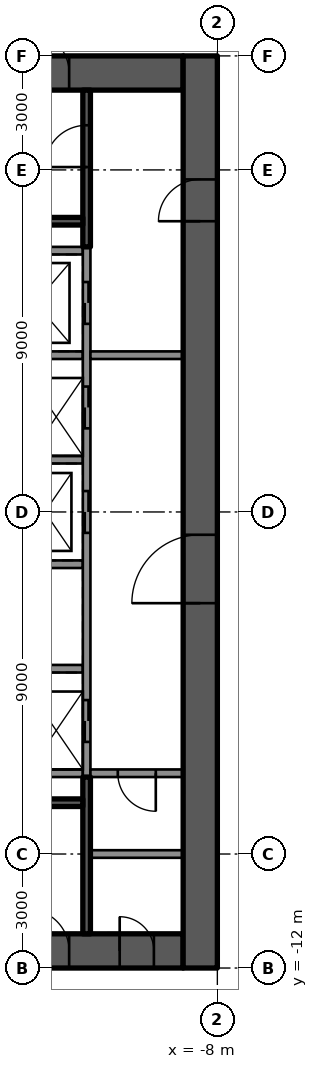
"""IFC4 building model, lengths in metres.
Left out: names, types, materials, properties, quantities, classifications, styles, units other than length and angle.
Written with IfcOpenShell. Run it as: python <this file> out.ifc"""

import sys

from ifc_helpers import new_model, si_unit, direction, frame, frame_2d, origin, place, context, subcontext, project, spatial, rectangle, extrude, element, fill, save


model = new_model("IFC4")
c1 = context("Model", 3, precision=1e-05, world=origin(), true_north=direction((0.0, 1.0)))
c2 = subcontext(c1, "Body", "Model", "MODEL_VIEW")
j1 = project(units=[si_unit("LENGTHUNIT", "METRE"), si_unit("PLANEANGLEUNIT", "RADIAN")], contexts=[c1])
p1 = place(None, origin())
s1 = spatial("IfcSite", under=j1, at=p1, CompositionType="ELEMENT")
p2 = place(p1, origin())
s2 = spatial("IfcBuilding", under=s1, at=p2, CompositionType="ELEMENT")
p3 = place(p2, frame((0.0, 0.0, 25.1)))
s3 = spatial("IfcBuildingStorey", under=s2, at=p3, CompositionType="ELEMENT", Elevation=25.1)
p4 = place(p3, frame((-18.1, 11.55, 0.0), z_axis=(0.0, 0.0, 1.0), x_axis=(1.0, 0.0, 0.0)))
e1 = element("IfcWall", 1, at=p4, inside=s3, PredefinedType="SHEAR", context=c2, shape_type="SweptSolid", body=[
    extrude(rectangle(XDim=9.2, YDim=0.9, at=frame_2d((4.6, 0.0))), origin(), (0.0, 0.0, 1.0), 4.1),
])
p5 = place(p4, frame((5.1, 0.0, 0.0)))
e2 = element("IfcOpeningElement", 2, at=p5, cuts=e1, PredefinedType="OPENING", context=c2, shape_type="SweptSolid", body=[
    extrude(rectangle(XDim=1.1, YDim=2.1, at=frame_2d((0.55, 1.05))), frame((0.0, 0.46, 0.0), z_axis=(0.0, -1.0, 0.0), x_axis=(1.0, 0.0, 0.0)), (0.0, 0.0, 1.0), 0.92),
])
p6 = place(p3, frame((-18.1, -11.55, 0.0), z_axis=(0.0, 0.0, 1.0), x_axis=(1.0, 0.0, 0.0)))
e3 = element("IfcWall", 3, at=p6, inside=s3, PredefinedType="SHEAR", context=c2, shape_type="SweptSolid", body=[
    extrude(rectangle(XDim=9.2, YDim=0.9, at=frame_2d((4.6, 0.0))), origin(), (0.0, 0.0, 1.0), 4.1),
])
p7 = place(p6, frame((5.1, 0.0, 0.0)))
e4 = element("IfcOpeningElement", 4, at=p7, cuts=e3, PredefinedType="OPENING", context=c2, shape_type="SweptSolid", body=[
    extrude(rectangle(XDim=1.1, YDim=2.1, at=frame_2d((0.55, 1.05))), frame((0.0, 0.46, 0.0), z_axis=(0.0, -1.0, 0.0), x_axis=(1.0, 0.0, 0.0)), (0.0, 0.0, 1.0), 0.92),
])
p8 = place(p6, frame((7.53, 0.0, 0.0)))
e5 = element("IfcOpeningElement", 5, at=p8, cuts=e3, PredefinedType="OPENING", context=c2, shape_type="SweptSolid", body=[
    extrude(rectangle(XDim=0.9, YDim=2.1, at=frame_2d((0.45, 1.05))), frame((0.0, 0.46, 0.0), z_axis=(0.0, -1.0, 0.0), x_axis=(1.0, 0.0, 0.0)), (0.0, 0.0, 1.0), 0.92),
])
p9 = place(p3, frame((-8.45, -12.0, 0.0), z_axis=(0.0, 0.0, 1.0), x_axis=(0.0, 1.0, 0.0)))
e6 = element("IfcWall", 6, at=p9, inside=s3, PredefinedType="SHEAR", context=c2, shape_type="SweptSolid", body=[
    extrude(rectangle(XDim=24.0, YDim=0.9, at=frame_2d((12.0, 0.0))), origin(), (0.0, 0.0, 1.0), 4.1),
])
p10 = place(p9, frame((9.6, 0.0, 0.0)))
e7 = element("IfcOpeningElement", 7, at=p10, cuts=e6, PredefinedType="OPENING", context=c2, shape_type="SweptSolid", body=[
    extrude(rectangle(XDim=1.8, YDim=2.1, at=frame_2d((0.9, 1.05))), frame((0.0, 0.46, 0.0), z_axis=(0.0, -1.0, 0.0), x_axis=(1.0, 0.0, 0.0)), (0.0, 0.0, 1.0), 0.92),
])
p11 = place(p9, frame((19.65, 0.0, 0.0)))
e8 = element("IfcOpeningElement", 8, at=p11, cuts=e6, PredefinedType="OPENING", context=c2, shape_type="SweptSolid", body=[
    extrude(rectangle(XDim=1.1, YDim=2.1, at=frame_2d((0.55, 1.05))), frame((0.0, 0.46, 0.0), z_axis=(0.0, -1.0, 0.0), x_axis=(1.0, 0.0, 0.0)), (0.0, 0.0, 1.0), 0.92),
])
for number, where, z_axis, x_axis in (
    (9, (-11.54, 6.875, 0.0), (0.0, 0.0, 1.0), (-1.0, 0.0, 0.0)),
    (10, (-11.54, -6.875, 0.0), (0.0, 0.0, 1.0), (-1.0, 0.0, 0.0)),
):
    element("IfcWall", number, at=place(p3, frame(where, z_axis=z_axis, x_axis=x_axis)), inside=s3, PredefinedType="SOLIDWALL", context=c2, shape_type="SweptSolid", body=[
        extrude(rectangle(XDim=6.56, YDim=0.2, at=frame_2d((3.28, 0.0))), origin(), (0.0, 0.0, 1.0), 3.69),
    ])
p12 = place(p3, frame((-11.54, -4.125, 0.0), z_axis=(0.0, 0.0, 1.0), x_axis=(-1.0, 0.0, 0.0)))
e11 = element("IfcWall", 11, at=p12, inside=s3, PredefinedType="SOLIDWALL", context=c2, shape_type="SweptSolid", body=[
    extrude(rectangle(XDim=4.7, YDim=0.2, at=frame_2d((2.35, 0.0))), origin(), (0.0, 0.0, 1.0), 3.69),
])
for number, where, z_axis, x_axis in (
    (12, (-11.54, -1.375, 0.0), (0.0, 0.0, 1.0), (-1.0, 0.0, 0.0)),
    (13, (-11.54, 1.375, 0.0), (0.0, 0.0, 1.0), (-1.0, 0.0, 0.0)),
):
    element("IfcWall", number, at=place(p3, frame(where, z_axis=z_axis, x_axis=x_axis)), inside=s3, PredefinedType="SOLIDWALL", context=c2, shape_type="SweptSolid", body=[
        extrude(rectangle(XDim=4.2, YDim=0.2, at=frame_2d((2.1, 0.0))), origin(), (0.0, 0.0, 1.0), 3.69),
    ])
p13 = place(p3, frame((-11.54, 4.125, 0.0), z_axis=(0.0, 0.0, 1.0), x_axis=(-1.0, 0.0, 0.0)))
e14 = element("IfcWall", 14, at=p13, inside=s3, PredefinedType="SOLIDWALL", context=c2, shape_type="SweptSolid", body=[
    extrude(rectangle(XDim=4.7, YDim=0.2, at=frame_2d((2.35, 0.0))), origin(), (0.0, 0.0, 1.0), 3.69),
])
p14 = place(p3, frame((-11.44, -6.975, 0.0), z_axis=(0.0, 0.0, 1.0), x_axis=(0.0, 1.0, 0.0)))
e15 = element("IfcWall", 15, at=p14, inside=s3, PredefinedType="SOLIDWALL", context=c2, shape_type="SweptSolid", body=[
    extrude(rectangle(XDim=13.95, YDim=0.2, at=frame_2d((6.975, 0.0))), origin(), (0.0, 0.0, 1.0), 3.69),
])
p15 = place(p14, frame((0.925, 0.0, 0.0)))
e16 = element("IfcOpeningElement", 16, at=p15, cuts=e15, PredefinedType="OPENING", context=c2, shape_type="SweptSolid", body=[
    extrude(rectangle(XDim=1.1, YDim=2.1, at=frame_2d((0.55, 1.05))), frame((0.0, 0.11, 0.0), z_axis=(0.0, -1.0, 0.0), x_axis=(1.0, 0.0, 0.0)), (0.0, 0.0, 1.0), 0.22),
])
p16 = place(p14, frame((6.425, 0.0, 0.0)))
e17 = element("IfcOpeningElement", 17, at=p16, cuts=e15, PredefinedType="OPENING", context=c2, shape_type="SweptSolid", body=[
    extrude(rectangle(XDim=1.1, YDim=2.1, at=frame_2d((0.55, 1.05))), frame((0.0, 0.11, 0.0), z_axis=(0.0, -1.0, 0.0), x_axis=(1.0, 0.0, 0.0)), (0.0, 0.0, 1.0), 0.22),
])
p17 = place(p14, frame((9.175, 0.0, 0.0)))
e18 = element("IfcOpeningElement", 18, at=p17, cuts=e15, PredefinedType="OPENING", context=c2, shape_type="SweptSolid", body=[
    extrude(rectangle(XDim=1.1, YDim=2.1, at=frame_2d((0.55, 1.05))), frame((0.0, 0.11, 0.0), z_axis=(0.0, -1.0, 0.0), x_axis=(1.0, 0.0, 0.0)), (0.0, 0.0, 1.0), 0.22),
])
p18 = place(p14, frame((11.925, 0.0, 0.0)))
e19 = element("IfcOpeningElement", 19, at=p18, cuts=e15, PredefinedType="OPENING", context=c2, shape_type="SweptSolid", body=[
    extrude(rectangle(XDim=1.1, YDim=2.1, at=frame_2d((0.55, 1.05))), frame((0.0, 0.11, 0.0), z_axis=(0.0, -1.0, 0.0), x_axis=(1.0, 0.0, 0.0)), (0.0, 0.0, 1.0), 0.22),
])
p19 = place(p3, frame((-11.44, 6.975, 0.0), z_axis=(0.0, 0.0, 1.0), x_axis=(0.0, 1.0, 0.0)))
e20 = element("IfcWall", 20, at=p19, inside=s3, PredefinedType="SOLIDWALL", context=c2, shape_type="SweptSolid", body=[
    extrude(rectangle(XDim=4.125, YDim=0.2, at=frame_2d((2.062, 0.0))), origin(), (0.0, 0.0, 1.0), 3.69),
])
p20 = place(p19, frame((2.1, 0.0, 0.0)))
e21 = element("IfcOpeningElement", 21, at=p20, cuts=e20, PredefinedType="OPENING", context=c2, shape_type="SweptSolid", body=[
    extrude(rectangle(XDim=1.1, YDim=2.1, at=frame_2d((0.55, 1.05))), frame((0.0, 0.11, 0.0), z_axis=(0.0, -1.0, 0.0), x_axis=(1.0, 0.0, 0.0)), (0.0, 0.0, 1.0), 0.22),
])
p21 = place(p3, frame((-11.54, 7.65, 0.0), z_axis=(0.0, 0.0, 1.0), x_axis=(-1.0, 0.0, 0.0)))
e22 = element("IfcWall", 22, at=p21, inside=s3, PredefinedType="SOLIDWALL", context=c2, shape_type="SweptSolid", body=[
    extrude(rectangle(XDim=6.56, YDim=0.2, at=frame_2d((3.28, 0.0))), origin(), (0.0, 0.0, 1.0), 3.69),
])
p22 = place(p3, frame((-11.44, -11.1, 0.0), z_axis=(0.0, 0.0, 1.0), x_axis=(0.0, 1.0, 0.0)))
e23 = element("IfcWall", 23, at=p22, inside=s3, PredefinedType="SOLIDWALL", context=c2, shape_type="SweptSolid", body=[
    extrude(rectangle(XDim=4.125, YDim=0.2, at=frame_2d((2.062, 0.0))), origin(), (0.0, 0.0, 1.0), 3.69),
])
p23 = place(p3, frame((-11.54, -7.65, 0.0), z_axis=(0.0, 0.0, 1.0), x_axis=(-1.0, 0.0, 0.0)))
e24 = element("IfcWall", 24, at=p23, inside=s3, PredefinedType="SOLIDWALL", context=c2, shape_type="SweptSolid", body=[
    extrude(rectangle(XDim=6.56, YDim=0.2, at=frame_2d((3.28, 0.0))), origin(), (0.0, 0.0, 1.0), 3.69),
])
p24 = place(p3, frame((-8.9, 4.125, 0.0), z_axis=(0.0, 0.0, 1.0), x_axis=(-1.0, 0.0, 0.0)))
e25 = element("IfcWall", 25, at=p24, inside=s3, PredefinedType="PARTITIONING", context=c2, shape_type="SweptSolid", body=[
    extrude(rectangle(XDim=2.44, YDim=0.2, at=frame_2d((1.22, 0.0))), origin(), (0.0, 0.0, 1.0), 3.69),
])
p25 = place(p3, frame((-8.9, -6.875, 0.0), z_axis=(0.0, 0.0, 1.0), x_axis=(-1.0, 0.0, 0.0)))
e26 = element("IfcWall", 26, at=p25, inside=s3, PredefinedType="PARTITIONING", context=c2, shape_type="SweptSolid", body=[
    extrude(rectangle(XDim=2.44, YDim=0.2, at=frame_2d((1.22, 0.0))), origin(), (0.0, 0.0, 1.0), 3.69),
])
p26 = place(p25, frame((0.72, 0.0, 0.0)))
e27 = element("IfcOpeningElement", 27, at=p26, cuts=e26, PredefinedType="OPENING", context=c2, shape_type="SweptSolid", body=[
    extrude(rectangle(XDim=1.0, YDim=2.1, at=frame_2d((0.5, 1.05))), frame((0.0, 0.11, 0.0), z_axis=(0.0, -1.0, 0.0), x_axis=(1.0, 0.0, 0.0)), (0.0, 0.0, 1.0), 0.22),
])
p27 = place(p3, frame((-8.9, -9.0, 0.0), z_axis=(0.0, 0.0, 1.0), x_axis=(-1.0, 0.0, 0.0)))
e28 = element("IfcWall", 28, at=p27, inside=s3, PredefinedType="PARTITIONING", context=c2, shape_type="SweptSolid", body=[
    extrude(rectangle(XDim=2.44, YDim=0.2, at=frame_2d((1.22, 0.0))), origin(), (0.0, 0.0, 1.0), 3.69),
])
p28 = place(p15, origin())
e29 = element("IfcDoor", 29, at=p28, inside=s3, OperationType="DOUBLE_DOOR_SLIDING", PredefinedType="DOOR", context=c2, shape_type="SweptSolid", body=[
    extrude(rectangle(XDim=1.1, YDim=2.1, at=frame_2d((0.55, 1.05))), frame((0.0, 0.025, 0.0), z_axis=(0.0, -1.0, 0.0), x_axis=(1.0, 0.0, 0.0)), (0.0, 0.0, 1.0), 0.05),
])
fill(e16, e29)
p29 = place(p16, origin())
e30 = element("IfcDoor", 30, at=p29, inside=s3, OperationType="DOUBLE_DOOR_SLIDING", PredefinedType="DOOR", context=c2, shape_type="SweptSolid", body=[
    extrude(rectangle(XDim=1.1, YDim=2.1, at=frame_2d((0.55, 1.05))), frame((0.0, 0.025, 0.0), z_axis=(0.0, -1.0, 0.0), x_axis=(1.0, 0.0, 0.0)), (0.0, 0.0, 1.0), 0.05),
])
fill(e17, e30)
p30 = place(p17, origin())
e31 = element("IfcDoor", 31, at=p30, inside=s3, OperationType="DOUBLE_DOOR_SLIDING", PredefinedType="DOOR", context=c2, shape_type="SweptSolid", body=[
    extrude(rectangle(XDim=1.1, YDim=2.1, at=frame_2d((0.55, 1.05))), frame((0.0, 0.025, 0.0), z_axis=(0.0, -1.0, 0.0), x_axis=(1.0, 0.0, 0.0)), (0.0, 0.0, 1.0), 0.05),
])
fill(e18, e31)
p31 = place(p18, origin())
e32 = element("IfcDoor", 32, at=p31, inside=s3, OperationType="DOUBLE_DOOR_SLIDING", PredefinedType="DOOR", context=c2, shape_type="SweptSolid", body=[
    extrude(rectangle(XDim=1.1, YDim=2.1, at=frame_2d((0.55, 1.05))), frame((0.0, 0.025, 0.0), z_axis=(0.0, -1.0, 0.0), x_axis=(1.0, 0.0, 0.0)), (0.0, 0.0, 1.0), 0.05),
])
fill(e19, e32)
p32 = place(p10, origin())
e33 = element("IfcDoor", 33, at=p32, inside=s3, OperationType="SINGLE_SWING_LEFT", PredefinedType="DOOR", context=c2, shape_type="SweptSolid", body=[
    extrude(rectangle(XDim=1.8, YDim=2.1, at=frame_2d((0.9, 1.05))), frame((0.0, 0.025, 0.0), z_axis=(0.0, -1.0, 0.0), x_axis=(1.0, 0.0, 0.0)), (0.0, 0.0, 1.0), 0.05),
])
fill(e7, e33)
p33 = place(p11, origin())
e34 = element("IfcDoor", 34, at=p33, inside=s3, OperationType="SINGLE_SWING_RIGHT", PredefinedType="DOOR", context=c2, shape_type="SweptSolid", body=[
    extrude(rectangle(XDim=1.1, YDim=2.1, at=frame_2d((0.55, 1.05))), frame((0.0, 0.025, 0.0), z_axis=(0.0, -1.0, 0.0), x_axis=(1.0, 0.0, 0.0)), (0.0, 0.0, 1.0), 0.05),
])
fill(e8, e34)
p34 = place(p5, origin())
e35 = element("IfcDoor", 35, at=p34, inside=s3, OperationType="SINGLE_SWING_RIGHT", PredefinedType="DOOR", context=c2, shape_type="SweptSolid", body=[
    extrude(rectangle(XDim=1.1, YDim=2.1, at=frame_2d((0.55, 1.05))), frame((0.0, 0.025, 0.0), z_axis=(0.0, -1.0, 0.0), x_axis=(1.0, 0.0, 0.0)), (0.0, 0.0, 1.0), 0.05),
])
fill(e2, e35)
p35 = place(p7, origin())
e36 = element("IfcDoor", 36, at=p35, inside=s3, OperationType="SINGLE_SWING_RIGHT", PredefinedType="DOOR", context=c2, shape_type="SweptSolid", body=[
    extrude(rectangle(XDim=1.1, YDim=2.1, at=frame_2d((0.55, 1.05))), frame((0.0, 0.025, 0.0), z_axis=(0.0, -1.0, 0.0), x_axis=(1.0, 0.0, 0.0)), (0.0, 0.0, 1.0), 0.05),
])
fill(e4, e36)
p36 = place(p20, origin())
e37 = element("IfcDoor", 37, at=p36, inside=s3, OperationType="SINGLE_SWING_RIGHT", PredefinedType="DOOR", context=c2, shape_type="SweptSolid", body=[
    extrude(rectangle(XDim=1.1, YDim=2.1, at=frame_2d((0.55, 1.05))), frame((0.0, 0.025, 0.0), z_axis=(0.0, -1.0, 0.0), x_axis=(1.0, 0.0, 0.0)), (0.0, 0.0, 1.0), 0.05),
])
fill(e21, e37)
p37 = place(p8, origin())
e38 = element("IfcDoor", 38, at=p37, inside=s3, OperationType="SINGLE_SWING_RIGHT", PredefinedType="DOOR", context=c2, shape_type="SweptSolid", body=[
    extrude(rectangle(XDim=0.9, YDim=2.1, at=frame_2d((0.45, 1.05))), frame((0.0, 0.025, 0.0), z_axis=(0.0, -1.0, 0.0), x_axis=(1.0, 0.0, 0.0)), (0.0, 0.0, 1.0), 0.05),
])
fill(e5, e38)
p38 = place(p26, origin())
e39 = element("IfcDoor", 39, at=p38, inside=s3, OperationType="SINGLE_SWING_RIGHT", PredefinedType="DOOR", context=c2, shape_type="SweptSolid", body=[
    extrude(rectangle(XDim=1.0, YDim=2.1, at=frame_2d((0.5, 1.05))), frame((0.0, 0.025, 0.0), z_axis=(0.0, -1.0, 0.0), x_axis=(1.0, 0.0, 0.0)), (0.0, 0.0, 1.0), 0.05),
])
fill(e27, e39)
save(model, sys.argv[1])
